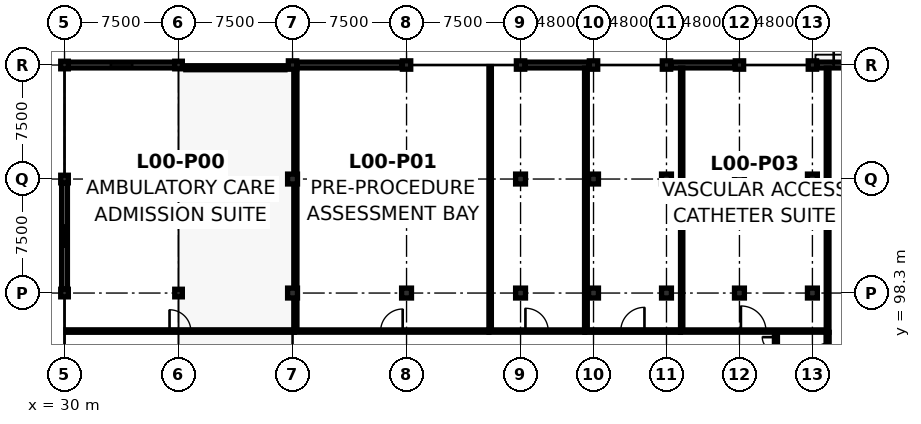
"""IFC4 building model, lengths in metres.
Left out: names, types, materials, properties, quantities, classifications, styles, units other than length and angle.
Written with IfcOpenShell. Run it as: python <this file> out.ifc"""

import sys

from ifc_helpers import new_model, si_unit, direction, frame, frame_2d, origin, origin_2d, place, context, subcontext, project, spatial, rectangle, extrude, element, fill, save


model = new_model("IFC4")
c1 = context("Model", 3, precision=1e-05, world=origin(), true_north=direction((0.0, 1.0)))
c2 = subcontext(c1, "Body", "Model", "MODEL_VIEW")
j1 = project(units=[si_unit("LENGTHUNIT", "METRE"), si_unit("PLANEANGLEUNIT", "RADIAN")], contexts=[c1])
p1 = place(None, origin())
s1 = spatial("IfcSite", under=j1, at=p1, CompositionType="ELEMENT")
p2 = place(p1, origin())
s2 = spatial("IfcBuilding", under=s1, at=p2, CompositionType="ELEMENT")
p3 = place(p2, origin())
s3 = spatial("IfcBuildingStorey", under=s2, at=p3, CompositionType="ELEMENT", Elevation=0.0)
for number, where, z_axis, x_axis in (
    (1, (30.0, 98.3, 0.0), (0.0, 0.0, 1.0), (1.0, 0.0, 0.0)),
    (2, (30.0, 105.8, 0.0), (0.0, 0.0, 1.0), (1.0, 0.0, 0.0)),
    (3, (30.0, 113.3, 0.0), (0.0, 0.0, 1.0), (1.0, 0.0, 0.0)),
):
    element("IfcColumn", number, at=place(p3, frame(where, z_axis=z_axis, x_axis=x_axis)), inside=s3, PredefinedType="COLUMN", context=c2, shape_type="SweptSolid", body=[
        extrude(rectangle(XDim=0.5, YDim=0.5, at=origin_2d()), origin(), (0.0, 0.0, 1.0), 6.136),
    ])
for number, where, z_axis, x_axis in (
    (4, (37.5, 98.3, 0.0), (0.0, 0.0, 1.0), (1.0, 0.0, 0.0)),
    (5, (37.5, 105.8, 0.0), (0.0, 0.0, 1.0), (1.0, 0.0, 0.0)),
    (6, (37.5, 113.3, 0.0), (0.0, 0.0, 1.0), (1.0, 0.0, 0.0)),
):
    element("IfcColumn", number, at=place(p3, frame(where, z_axis=z_axis, x_axis=x_axis)), inside=s3, PredefinedType="COLUMN", context=c2, shape_type="SweptSolid", body=[
        extrude(rectangle(XDim=0.5, YDim=0.5, at=origin_2d()), origin(), (0.0, 0.0, 1.0), 4.7),
    ])
for number, where, z_axis, x_axis in (
    (7, (45.0, 98.3, 0.0), (0.0, 0.0, 1.0), (1.0, 0.0, 0.0)),
    (8, (45.0, 105.8, 0.0), (0.0, 0.0, 1.0), (1.0, 0.0, 0.0)),
):
    element("IfcColumn", number, at=place(p3, frame(where, z_axis=z_axis, x_axis=x_axis)), inside=s3, PredefinedType="COLUMN", context=c2, shape_type="SweptSolid", body=[
        extrude(rectangle(XDim=0.65, YDim=0.65, at=origin_2d()), origin(), (0.0, 0.0, 1.0), 4.7),
    ])
p4 = place(p3, frame((45.0, 113.3, 0.0), z_axis=(0.0, 0.0, 1.0), x_axis=(1.0, 0.0, 0.0)))
e9 = element("IfcColumn", 9, at=p4, inside=s3, PredefinedType="COLUMN", context=c2, shape_type="SweptSolid", body=[
    extrude(rectangle(XDim=0.55, YDim=0.55, at=origin_2d()), origin(), (0.0, 0.0, 1.0), 4.7),
])
for number, where, z_axis, x_axis in (
    (10, (52.5, 98.3, 0.0), (0.0, 0.0, 1.0), (1.0, 0.0, 0.0)),
    (11, (52.5, 105.8, 0.0), (0.0, 0.0, 1.0), (1.0, 0.0, 0.0)),
):
    element("IfcColumn", number, at=place(p3, frame(where, z_axis=z_axis, x_axis=x_axis)), inside=s3, PredefinedType="COLUMN", context=c2, shape_type="SweptSolid", body=[
        extrude(rectangle(XDim=0.65, YDim=0.65, at=origin_2d()), origin(), (0.0, 0.0, 1.0), 4.7),
    ])
p5 = place(p3, frame((52.5, 113.3, 0.0), z_axis=(0.0, 0.0, 1.0), x_axis=(1.0, 0.0, 0.0)))
e12 = element("IfcColumn", 12, at=p5, inside=s3, PredefinedType="COLUMN", context=c2, shape_type="SweptSolid", body=[
    extrude(rectangle(XDim=0.55, YDim=0.55, at=origin_2d()), origin(), (0.0, 0.0, 1.0), 4.7),
])
for number, where, z_axis, x_axis in (
    (13, (60.0, 98.3, 0.0), (0.0, 0.0, 1.0), (1.0, 0.0, 0.0)),
    (14, (60.0, 105.8, 0.0), (0.0, 0.0, 1.0), (1.0, 0.0, 0.0)),
):
    element("IfcColumn", number, at=place(p3, frame(where, z_axis=z_axis, x_axis=x_axis)), inside=s3, PredefinedType="COLUMN", context=c2, shape_type="SweptSolid", body=[
        extrude(rectangle(XDim=0.65, YDim=0.65, at=origin_2d()), origin(), (0.0, 0.0, 1.0), 4.7),
    ])
p6 = place(p3, frame((60.0, 113.3, 0.0), z_axis=(0.0, 0.0, 1.0), x_axis=(1.0, 0.0, 0.0)))
e15 = element("IfcColumn", 15, at=p6, inside=s3, PredefinedType="COLUMN", context=c2, shape_type="SweptSolid", body=[
    extrude(rectangle(XDim=0.55, YDim=0.55, at=origin_2d()), origin(), (0.0, 0.0, 1.0), 4.7),
])
for number, where, z_axis, x_axis in (
    (16, (64.8, 98.3, 0.0), (0.0, 0.0, 1.0), (1.0, 0.0, 0.0)),
    (17, (64.8, 105.8, 0.0), (0.0, 0.0, 1.0), (1.0, 0.0, 0.0)),
):
    element("IfcColumn", number, at=place(p3, frame(where, z_axis=z_axis, x_axis=x_axis)), inside=s3, PredefinedType="COLUMN", context=c2, shape_type="SweptSolid", body=[
        extrude(rectangle(XDim=0.65, YDim=0.65, at=origin_2d()), origin(), (0.0, 0.0, 1.0), 4.7),
    ])
p7 = place(p3, frame((64.8, 113.3, 0.0), z_axis=(0.0, 0.0, 1.0), x_axis=(1.0, 0.0, 0.0)))
e18 = element("IfcColumn", 18, at=p7, inside=s3, PredefinedType="COLUMN", context=c2, shape_type="SweptSolid", body=[
    extrude(rectangle(XDim=0.55, YDim=0.55, at=origin_2d()), origin(), (0.0, 0.0, 1.0), 4.7),
])
for number, where, z_axis, x_axis in (
    (19, (69.6, 98.3, 0.0), (0.0, 0.0, 1.0), (1.0, 0.0, 0.0)),
    (20, (69.6, 105.8, 0.0), (0.0, 0.0, 1.0), (1.0, 0.0, 0.0)),
):
    element("IfcColumn", number, at=place(p3, frame(where, z_axis=z_axis, x_axis=x_axis)), inside=s3, PredefinedType="COLUMN", context=c2, shape_type="SweptSolid", body=[
        extrude(rectangle(XDim=0.65, YDim=0.65, at=origin_2d()), origin(), (0.0, 0.0, 1.0), 4.7),
    ])
p8 = place(p3, frame((69.6, 113.3, 0.0), z_axis=(0.0, 0.0, 1.0), x_axis=(1.0, 0.0, 0.0)))
e21 = element("IfcColumn", 21, at=p8, inside=s3, PredefinedType="COLUMN", context=c2, shape_type="SweptSolid", body=[
    extrude(rectangle(XDim=0.55, YDim=0.55, at=origin_2d()), origin(), (0.0, 0.0, 1.0), 4.7),
])
for number, where, z_axis, x_axis in (
    (22, (74.4, 98.3, 0.0), (0.0, 0.0, 1.0), (1.0, 0.0, 0.0)),
    (23, (74.4, 105.8, 0.0), (0.0, 0.0, 1.0), (1.0, 0.0, 0.0)),
):
    element("IfcColumn", number, at=place(p3, frame(where, z_axis=z_axis, x_axis=x_axis)), inside=s3, PredefinedType="COLUMN", context=c2, shape_type="SweptSolid", body=[
        extrude(rectangle(XDim=0.65, YDim=0.65, at=origin_2d()), origin(), (0.0, 0.0, 1.0), 4.7),
    ])
p9 = place(p3, frame((74.4, 113.3, 0.0), z_axis=(0.0, 0.0, 1.0), x_axis=(1.0, 0.0, 0.0)))
e24 = element("IfcColumn", 24, at=p9, inside=s3, PredefinedType="COLUMN", context=c2, shape_type="SweptSolid", body=[
    extrude(rectangle(XDim=0.55, YDim=0.55, at=origin_2d()), origin(), (0.0, 0.0, 1.0), 4.7),
])
for number, where, z_axis, x_axis in (
    (25, (79.2, 98.3, 0.0), (0.0, 0.0, 1.0), (1.0, 0.0, 0.0)),
    (26, (79.2, 105.8, 0.0), (0.0, 0.0, 1.0), (1.0, 0.0, 0.0)),
):
    element("IfcColumn", number, at=place(p3, frame(where, z_axis=z_axis, x_axis=x_axis)), inside=s3, PredefinedType="COLUMN", context=c2, shape_type="SweptSolid", body=[
        extrude(rectangle(XDim=0.65, YDim=0.65, at=origin_2d()), origin(), (0.0, 0.0, 1.0), 4.7),
    ])
p10 = place(p3, frame((79.2, 113.3, 0.0), z_axis=(0.0, 0.0, 1.0), x_axis=(1.0, 0.0, 0.0)))
e27 = element("IfcColumn", 27, at=p10, inside=s3, PredefinedType="COLUMN", context=c2, shape_type="SweptSolid", body=[
    extrude(rectangle(XDim=0.55, YDim=0.55, at=origin_2d()), origin(), (0.0, 0.0, 1.0), 4.7),
])
p11 = place(p3, frame((30.0, 98.55, 0.0), z_axis=(0.0, 0.0, 1.0), x_axis=(0.0, 1.0, 0.0)))
e28 = element("IfcWall", 28, at=p11, inside=s3, PredefinedType="SOLIDWALL", context=c2, shape_type="SweptSolid", body=[
    extrude(rectangle(XDim=7.0, YDim=0.38, at=frame_2d((3.5, 0.0))), origin(), (0.0, 0.0, 1.0), 4.67),
])
p12 = place(p11, frame((2.8, 0.0, 0.9)))
e29 = element("IfcOpeningElement", 29, at=p12, cuts=e28, PredefinedType="OPENING", context=c2, shape_type="SweptSolid", body=[
    extrude(rectangle(XDim=1.4, YDim=1.5, at=frame_2d((0.7, 0.75))), frame((0.0, 0.202, 0.0), z_axis=(0.0, -1.0, 0.0), x_axis=(1.0, 0.0, 0.0)), (0.0, 0.0, 1.0), 0.404),
])
p13 = place(p3, frame((30.25, 113.3, 0.0), z_axis=(0.0, 0.0, 1.0), x_axis=(1.0, 0.0, 0.0)))
e30 = element("IfcWall", 30, at=p13, inside=s3, PredefinedType="SOLIDWALL", context=c2, shape_type="SweptSolid", body=[
    extrude(rectangle(XDim=7.0, YDim=0.38, at=frame_2d((3.5, 0.0))), origin(), (0.0, 0.0, 1.0), 4.67),
])
p14 = place(p13, frame((2.8, 0.0, 0.9)))
e31 = element("IfcOpeningElement", 31, at=p14, cuts=e30, PredefinedType="OPENING", context=c2, shape_type="SweptSolid", body=[
    extrude(rectangle(XDim=1.4, YDim=1.7, at=frame_2d((0.7, 0.85))), frame((0.0, 0.202, 0.0), z_axis=(0.0, -1.0, 0.0), x_axis=(1.0, 0.0, 0.0)), (0.0, 0.0, 1.0), 0.404),
])
p15 = place(p3, frame((45.275, 113.3, 0.0), z_axis=(0.0, 0.0, 1.0), x_axis=(1.0, 0.0, 0.0)))
e32 = element("IfcWall", 32, at=p15, inside=s3, PredefinedType="SOLIDWALL", context=c2, shape_type="SweptSolid", body=[
    extrude(rectangle(XDim=6.95, YDim=0.38, at=frame_2d((3.475, 0.0))), origin(), (0.0, 0.0, 1.0), 3.985),
])
for number, where, z_axis, x_axis in (
    (33, (60.275, 113.3, 0.0), (0.0, 0.0, 1.0), (1.0, 0.0, 0.0)),
    (34, (69.875, 113.3, 0.0), (0.0, 0.0, 1.0), (1.0, 0.0, 0.0)),
):
    element("IfcWall", number, at=place(p3, frame(where, z_axis=z_axis, x_axis=x_axis)), inside=s3, PredefinedType="SOLIDWALL", context=c2, shape_type="SweptSolid", body=[
        extrude(rectangle(XDim=4.25, YDim=0.38, at=frame_2d((2.125, 0.0))), origin(), (0.0, 0.0, 1.0), 3.985),
    ])
p16 = place(p3, frame((79.475, 113.3, 0.0), z_axis=(0.0, 0.0, 1.0), x_axis=(1.0, 0.0, 0.0)))
e35 = element("IfcWall", 35, at=p16, inside=s3, PredefinedType="SOLIDWALL", context=c2, shape_type="SweptSolid", body=[
    extrude(rectangle(XDim=4.25, YDim=0.38, at=frame_2d((2.125, 0.0))), origin(), (0.0, 0.0, 1.0), 3.985),
])
p17 = place(p16, frame((1.125, 0.0, 0.0)))
e36 = element("IfcOpeningElement", 36, at=p17, cuts=e35, PredefinedType="OPENING", context=c2, shape_type="SweptSolid", body=[
    extrude(rectangle(XDim=2.0, YDim=2.35, at=frame_2d((1.0, 1.175))), frame((0.0, 0.202, 0.0), z_axis=(0.0, -1.0, 0.0), x_axis=(1.0, 0.0, 0.0)), (0.0, 0.0, 1.0), 0.404),
])
p18 = place(p3, frame((37.98, 113.12, 4.9), z_axis=(0.0, 0.0, 1.0), x_axis=(1.0, 0.0, 0.0)))
e37 = element("IfcWall", 37, at=p18, inside=s3, PredefinedType="PARAPET", context=c2, shape_type="SweptSolid", body=[
    extrude(rectangle(XDim=6.52, YDim=0.26, at=frame_2d((3.26, 0.0))), origin(), (0.0, 0.0, 1.0), 0.6),
])
p19 = place(p3, frame((76.8, 93.285, 0.0), z_axis=(0.0, 0.0, 1.0), x_axis=(0.0, 1.0, 0.0)))
e38 = element("IfcWall", 38, at=p19, inside=s3, PredefinedType="PARTITIONING", context=c2, shape_type="SweptSolid", body=[
    extrude(rectangle(XDim=2.43, YDim=0.2, at=frame_2d((1.215, 0.0))), origin(), (0.0, 0.0, 1.0), 4.7),
])
p20 = place(p19, frame((0.315, 0.0, 0.0)))
e39 = element("IfcOpeningElement", 39, at=p20, cuts=e38, PredefinedType="OPENING", context=c2, shape_type="SweptSolid", body=[
    extrude(rectangle(XDim=1.8, YDim=2.15, at=frame_2d((0.9, 1.075))), frame((0.0, 0.112, 0.0), z_axis=(0.0, -1.0, 0.0), x_axis=(1.0, 0.0, 0.0)), (0.0, 0.0, 1.0), 0.224),
])
p21 = place(p3, frame((30.102, 95.8, 0.0), z_axis=(0.0, 0.0, 1.0), x_axis=(1.0, 0.0, 0.0)))
e40 = element("IfcWall", 40, at=p21, inside=s3, PredefinedType="PARTITIONING", context=c2, shape_type="SweptSolid", body=[
    extrude(rectangle(XDim=15.013, YDim=0.16, at=frame_2d((7.506, 0.0))), origin(), (0.0, 0.0, 1.0), 4.035),
])
p22 = place(p21, frame((6.806, 0.0, 0.0)))
e41 = element("IfcOpeningElement", 41, at=p22, cuts=e40, PredefinedType="OPENING", context=c2, shape_type="SweptSolid", body=[
    extrude(rectangle(XDim=1.4, YDim=2.25, at=frame_2d((0.7, 1.125))), frame((0.0, 0.092, 0.0), z_axis=(0.0, -1.0, 0.0), x_axis=(1.0, 0.0, 0.0)), (0.0, 0.0, 1.0), 0.184),
])
p23 = place(p3, frame((45.127, 95.8, 0.0), z_axis=(0.0, 0.0, 1.0), x_axis=(1.0, 0.0, 0.0)))
e42 = element("IfcWall", 42, at=p23, inside=s3, PredefinedType="PARTITIONING", context=c2, shape_type="SweptSolid", body=[
    extrude(rectangle(XDim=12.788, YDim=0.15, at=frame_2d((6.394, 0.0))), origin(), (0.0, 0.0, 1.0), 3.985),
])
p24 = place(p23, frame((5.669, 0.0, 0.0)))
e43 = element("IfcOpeningElement", 43, at=p24, cuts=e42, PredefinedType="OPENING", context=c2, shape_type="SweptSolid", body=[
    extrude(rectangle(XDim=1.45, YDim=2.26, at=frame_2d((0.725, 1.13))), frame((0.0, 0.087, 0.0), z_axis=(0.0, -1.0, 0.0), x_axis=(1.0, 0.0, 0.0)), (0.0, 0.0, 1.0), 0.174),
])
p25 = place(p3, frame((57.927, 95.8, 0.0), z_axis=(0.0, 0.0, 1.0), x_axis=(1.0, 0.0, 0.0)))
e44 = element("IfcWall", 44, at=p25, inside=s3, PredefinedType="PARTITIONING", context=c2, shape_type="SweptSolid", body=[
    extrude(rectangle(XDim=6.288, YDim=0.15, at=frame_2d((3.144, 0.0))), origin(), (0.0, 0.0, 1.0), 3.985),
])
p26 = place(p25, frame((2.394, 0.0, 0.0)))
e45 = element("IfcOpeningElement", 45, at=p26, cuts=e44, PredefinedType="OPENING", context=c2, shape_type="SweptSolid", body=[
    extrude(rectangle(XDim=1.5, YDim=2.28, at=frame_2d((0.75, 1.14))), frame((0.0, 0.087, 0.0), z_axis=(0.0, -1.0, 0.0), x_axis=(1.0, 0.0, 0.0)), (0.0, 0.0, 1.0), 0.174),
])
p27 = place(p3, frame((64.227, 95.8, 0.0), z_axis=(0.0, 0.0, 1.0), x_axis=(1.0, 0.0, 0.0)))
e46 = element("IfcWall", 46, at=p27, inside=s3, PredefinedType="PARTITIONING", context=c2, shape_type="SweptSolid", body=[
    extrude(rectangle(XDim=6.288, YDim=0.16, at=frame_2d((3.144, 0.0))), origin(), (0.0, 0.0, 1.0), 3.985),
])
p28 = place(p27, frame((2.364, 0.0, 0.0)))
e47 = element("IfcOpeningElement", 47, at=p28, cuts=e46, PredefinedType="OPENING", context=c2, shape_type="SweptSolid", body=[
    extrude(rectangle(XDim=1.56, YDim=2.3, at=frame_2d((0.78, 1.15))), frame((0.0, 0.092, 0.0), z_axis=(0.0, -1.0, 0.0), x_axis=(1.0, 0.0, 0.0)), (0.0, 0.0, 1.0), 0.184),
])
p29 = place(p3, frame((70.527, 95.8, 0.0), z_axis=(0.0, 0.0, 1.0), x_axis=(1.0, 0.0, 0.0)))
e48 = element("IfcWall", 48, at=p29, inside=s3, PredefinedType="PARTITIONING", context=c2, shape_type="SweptSolid", body=[
    extrude(rectangle(XDim=9.588, YDim=0.15, at=frame_2d((4.794, 0.0))), origin(), (0.0, 0.0, 1.0), 3.985),
])
p30 = place(p29, frame((3.969, 0.0, 0.0)))
e49 = element("IfcOpeningElement", 49, at=p30, cuts=e48, PredefinedType="OPENING", context=c2, shape_type="SweptSolid", body=[
    extrude(rectangle(XDim=1.65, YDim=2.32, at=frame_2d((0.825, 1.16))), frame((0.0, 0.087, 0.0), z_axis=(0.0, -1.0, 0.0), x_axis=(1.0, 0.0, 0.0)), (0.0, 0.0, 1.0), 0.174),
])
p31 = place(p3, frame((80.2, 93.285, 0.0), z_axis=(0.0, 0.0, 1.0), x_axis=(0.0, 1.0, 0.0)))
e50 = element("IfcWall", 50, at=p31, inside=s3, PredefinedType="PARTITIONING", context=c2, shape_type="SweptSolid", body=[
    extrude(rectangle(XDim=2.43, YDim=0.2, at=frame_2d((1.215, 0.0))), origin(), (0.0, 0.0, 1.0), 4.7),
])
p32 = place(p31, frame((0.715, 0.0, 0.0)))
e51 = element("IfcOpeningElement", 51, at=p32, cuts=e50, PredefinedType="OPENING", context=c2, shape_type="SweptSolid", body=[
    extrude(rectangle(XDim=1.0, YDim=2.15, at=frame_2d((0.5, 1.075))), frame((0.0, 0.112, 0.0), z_axis=(0.0, -1.0, 0.0), x_axis=(1.0, 0.0, 0.0)), (0.0, 0.0, 1.0), 0.224),
])
p33 = place(p3, frame((45.2, 95.887, 0.0), z_axis=(0.0, 0.0, 1.0), x_axis=(0.0, 1.0, 0.0)))
e52 = element("IfcWall", 52, at=p33, inside=s3, PredefinedType="PARTITIONING", context=c2, shape_type="SweptSolid", body=[
    extrude(rectangle(XDim=17.126, YDim=0.18, at=frame_2d((8.563, 0.0))), origin(), (0.0, 0.0, 1.0), 3.985),
])
p34 = place(p3, frame((58.0, 95.887, 0.0), z_axis=(0.0, 0.0, 1.0), x_axis=(0.0, 1.0, 0.0)))
e53 = element("IfcWall", 53, at=p34, inside=s3, PredefinedType="PARTITIONING", context=c2, shape_type="SweptSolid", body=[
    extrude(rectangle(XDim=17.311, YDim=0.16, at=frame_2d((8.656, 0.0))), origin(), (0.0, 0.0, 1.0), 3.985),
])
p35 = place(p3, frame((64.3, 95.892, 0.0), z_axis=(0.0, 0.0, 1.0), x_axis=(0.0, 1.0, 0.0)))
e54 = element("IfcWall", 54, at=p35, inside=s3, PredefinedType="PARTITIONING", context=c2, shape_type="SweptSolid", body=[
    extrude(rectangle(XDim=17.206, YDim=0.18, at=frame_2d((8.603, 0.0))), origin(), (0.0, 0.0, 1.0), 4.035),
])
p36 = place(p3, frame((70.6, 95.887, 0.0), z_axis=(0.0, 0.0, 1.0), x_axis=(0.0, 1.0, 0.0)))
e55 = element("IfcWall", 55, at=p36, inside=s3, PredefinedType="PARTITIONING", context=c2, shape_type="SweptSolid", body=[
    extrude(rectangle(XDim=17.211, YDim=0.15, at=frame_2d((8.605, 0.0))), origin(), (0.0, 0.0, 1.0), 4.035),
])
p37 = place(p3, frame((80.2, 95.727, 0.0), z_axis=(0.0, 0.0, 1.0), x_axis=(0.0, 1.0, 0.0)))
e56 = element("IfcWall", 56, at=p37, inside=s3, PredefinedType="PARTITIONING", context=c2, shape_type="SweptSolid", body=[
    extrude(rectangle(XDim=17.371, YDim=0.18, at=frame_2d((8.686, 0.0))), origin(), (0.0, 0.0, 1.0), 4.035),
])
p38 = place(p12, origin())
e57 = element("IfcWindow", 57, at=p38, inside=s3, PartitioningType="SINGLE_PANEL", PredefinedType="WINDOW", context=c2, shape_type="SweptSolid", body=[
    extrude(rectangle(XDim=1.4, YDim=1.5, at=frame_2d((0.7, 0.75))), frame((0.0, 0.03, 0.0), z_axis=(0.0, -1.0, 0.0), x_axis=(1.0, 0.0, 0.0)), (0.0, 0.0, 1.0), 0.06),
])
fill(e29, e57)
p39 = place(p14, origin())
e58 = element("IfcWindow", 58, at=p39, inside=s3, PartitioningType="SINGLE_PANEL", PredefinedType="WINDOW", context=c2, shape_type="SweptSolid", body=[
    extrude(rectangle(XDim=1.4, YDim=1.7, at=frame_2d((0.7, 0.85))), frame((0.0, 0.03, 0.0), z_axis=(0.0, -1.0, 0.0), x_axis=(1.0, 0.0, 0.0)), (0.0, 0.0, 1.0), 0.06),
])
fill(e31, e58)
p40 = place(p17, origin())
e59 = element("IfcDoor", 59, at=p40, inside=s3, OperationType="DOUBLE_DOOR_SINGLE_SWING", PredefinedType="DOOR", context=c2, shape_type="SweptSolid", body=[
    extrude(rectangle(XDim=2.0, YDim=2.35, at=frame_2d((1.0, 1.175))), frame((0.0, 0.025, 0.0), z_axis=(0.0, -1.0, 0.0), x_axis=(1.0, 0.0, 0.0)), (0.0, 0.0, 1.0), 0.05),
])
fill(e36, e59)
p41 = place(p20, origin())
e60 = element("IfcDoor", 60, at=p41, inside=s3, OperationType="DOUBLE_DOOR_SINGLE_SWING", PredefinedType="DOOR", context=c2, shape_type="SweptSolid", body=[
    extrude(rectangle(XDim=1.8, YDim=2.15, at=frame_2d((0.9, 1.075))), frame((0.0, 0.025, 0.0), z_axis=(0.0, -1.0, 0.0), x_axis=(1.0, 0.0, 0.0)), (0.0, 0.0, 1.0), 0.05),
])
fill(e39, e60)
p42 = place(p22, origin())
e61 = element("IfcDoor", 61, at=p42, inside=s3, OperationType="SINGLE_SWING_LEFT", PredefinedType="DOOR", context=c2, shape_type="SweptSolid", body=[
    extrude(rectangle(XDim=1.4, YDim=2.25, at=frame_2d((0.7, 1.125))), frame((0.0, 0.025, 0.0), z_axis=(0.0, -1.0, 0.0), x_axis=(1.0, 0.0, 0.0)), (0.0, 0.0, 1.0), 0.05),
])
fill(e41, e61)
p43 = place(p24, origin())
e62 = element("IfcDoor", 62, at=p43, inside=s3, OperationType="SINGLE_SWING_RIGHT", PredefinedType="DOOR", context=c2, shape_type="SweptSolid", body=[
    extrude(rectangle(XDim=1.45, YDim=2.26, at=frame_2d((0.725, 1.13))), frame((0.0, 0.025, 0.0), z_axis=(0.0, -1.0, 0.0), x_axis=(1.0, 0.0, 0.0)), (0.0, 0.0, 1.0), 0.05),
])
fill(e43, e62)
p44 = place(p26, origin())
e63 = element("IfcDoor", 63, at=p44, inside=s3, OperationType="SINGLE_SWING_LEFT", PredefinedType="DOOR", context=c2, shape_type="SweptSolid", body=[
    extrude(rectangle(XDim=1.5, YDim=2.28, at=frame_2d((0.75, 1.14))), frame((0.0, 0.025, 0.0), z_axis=(0.0, -1.0, 0.0), x_axis=(1.0, 0.0, 0.0)), (0.0, 0.0, 1.0), 0.05),
])
fill(e45, e63)
p45 = place(p28, origin())
e64 = element("IfcDoor", 64, at=p45, inside=s3, OperationType="SINGLE_SWING_RIGHT", PredefinedType="DOOR", context=c2, shape_type="SweptSolid", body=[
    extrude(rectangle(XDim=1.56, YDim=2.3, at=frame_2d((0.78, 1.15))), frame((0.0, 0.025, 0.0), z_axis=(0.0, -1.0, 0.0), x_axis=(1.0, 0.0, 0.0)), (0.0, 0.0, 1.0), 0.05),
])
fill(e47, e64)
p46 = place(p30, origin())
e65 = element("IfcDoor", 65, at=p46, inside=s3, OperationType="SINGLE_SWING_LEFT", PredefinedType="DOOR", context=c2, shape_type="SweptSolid", body=[
    extrude(rectangle(XDim=1.65, YDim=2.32, at=frame_2d((0.825, 1.16))), frame((0.0, 0.025, 0.0), z_axis=(0.0, -1.0, 0.0), x_axis=(1.0, 0.0, 0.0)), (0.0, 0.0, 1.0), 0.05),
])
fill(e49, e65)
p47 = place(p32, origin())
e66 = element("IfcDoor", 66, at=p47, inside=s3, OperationType="SINGLE_SWING_LEFT", PredefinedType="DOOR", context=c2, shape_type="SweptSolid", body=[
    extrude(rectangle(XDim=1.0, YDim=2.15, at=frame_2d((0.5, 1.075))), frame((0.0, 0.025, 0.0), z_axis=(0.0, -1.0, 0.0), x_axis=(1.0, 0.0, 0.0)), (0.0, 0.0, 1.0), 0.05),
])
fill(e51, e66)
save(model, sys.argv[1])
